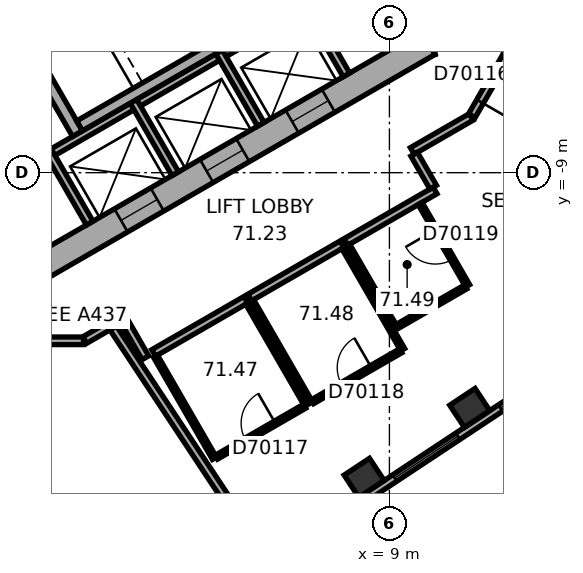
"""IFC4 building model, lengths in metres.
Left out: names, types, materials, properties, quantities, classifications, styles, units other than length and angle.
Written with IfcOpenShell. Run it as: python <this file> out.ifc"""

import sys

from ifc_helpers import new_model, si_unit, direction, frame, frame_2d, origin, origin_2d, place, context, subcontext, project, spatial, rectangle, extrude, element, fill, save


model = new_model("IFC4")
c1 = context("Model", 3, precision=1e-05, world=origin(), true_north=direction((0.0, 1.0)))
c2 = subcontext(c1, "Body", "Model", "MODEL_VIEW")
j1 = project(units=[si_unit("LENGTHUNIT", "METRE"), si_unit("PLANEANGLEUNIT", "RADIAN")], contexts=[c1])
p1 = place(None, origin())
s1 = spatial("IfcSite", under=j1, at=p1, CompositionType="ELEMENT")
p2 = place(p1, origin())
s2 = spatial("IfcBuilding", under=s1, at=p2, CompositionType="ELEMENT")
p3 = place(p2, frame((0.0, 0.0, 289.4)))
s3 = spatial("IfcBuildingStorey", under=s2, at=p3, CompositionType="ELEMENT", Elevation=289.4)
for number, where, z_axis, x_axis in (
    (1, (8.335, -17.028, 0.0), (0.0, 0.0, 1.0), (0.834, 0.552, 0.0)),
    (2, (11.113, -15.189, 0.0), (0.0, 0.0, 1.0), (0.834, 0.552, 0.0)),
):
    element("IfcColumn", number, at=place(p3, frame(where, z_axis=z_axis, x_axis=x_axis)), inside=s3, PredefinedType="COLUMN", context=c2, shape_type="SweptSolid", body=[
        extrude(rectangle(XDim=0.8, YDim=0.7, at=origin_2d()), origin(), (0.0, 0.0, 1.0), 3.7),
    ])
p4 = place(p3, frame((9.85, -5.889, 0.0), z_axis=(0.0, 0.0, 1.0), x_axis=(0.0, 1.0, 0.0)))
e3 = element("IfcWall", 3, at=p4, inside=s3, PredefinedType="SHEAR", context=c2, shape_type="SweptSolid", body=[
    extrude(rectangle(XDim=11.778, YDim=0.7, at=frame_2d((5.889, 0.0))), origin(), (0.0, 0.0, 1.0), 3.7),
])
p5 = place(p4, frame((6.089, 0.0, 0.0)))
e4 = element("IfcOpeningElement", 4, at=p5, cuts=e3, PredefinedType="OPENING", context=c2, shape_type="SweptSolid", body=[
    extrude(rectangle(XDim=1.5, YDim=2.1, at=frame_2d((0.75, 1.05))), frame((0.0, 0.36, 0.0), z_axis=(0.0, -1.0, 0.0), x_axis=(1.0, 0.0, 0.0)), (0.0, 0.0, 1.0), 0.72),
])
p6 = place(p4, frame((2.939, 0.0, 0.0)))
e5 = element("IfcOpeningElement", 5, at=p6, cuts=e3, PredefinedType="OPENING", context=c2, shape_type="SweptSolid", body=[
    extrude(rectangle(XDim=0.9, YDim=2.1, at=frame_2d((0.45, 1.05))), frame((0.0, 0.36, 0.0), z_axis=(0.0, -1.0, 0.0), x_axis=(1.0, 0.0, 0.0)), (0.0, 0.0, 1.0), 0.72),
])
p7 = place(p3, frame((-10.025, -5.586, 0.0), z_axis=(0.0, 0.0, 1.0), x_axis=(0.866026453023, -0.499998182661, 0.0)))
e6 = element("IfcWall", 6, at=p7, inside=s3, PredefinedType="SHEAR", context=c2, shape_type="SweptSolid", body=[
    extrude(rectangle(XDim=11.778, YDim=0.7, at=frame_2d((5.889, 0.0))), origin(), (0.0, 0.0, 1.0), 3.7),
])
p8 = place(p7, frame((6.089, 0.0, 0.0)))
e7 = element("IfcOpeningElement", 7, at=p8, cuts=e6, PredefinedType="OPENING", context=c2, shape_type="SweptSolid", body=[
    extrude(rectangle(XDim=1.5, YDim=2.1, at=frame_2d((0.75, 1.05))), frame((0.0, 0.36, 0.0), z_axis=(0.0, -1.0, 0.0), x_axis=(1.0, 0.0, 0.0)), (0.0, 0.0, 1.0), 0.72),
])
p9 = place(p7, frame((1.539, 0.0, 0.0)))
e8 = element("IfcOpeningElement", 8, at=p9, cuts=e6, PredefinedType="OPENING", context=c2, shape_type="SweptSolid", body=[
    extrude(rectangle(XDim=1.1, YDim=2.1, at=frame_2d((0.55, 1.05))), frame((0.0, 0.36, 0.0), z_axis=(0.0, -1.0, 0.0), x_axis=(1.0, 0.0, 0.0)), (0.0, 0.0, 1.0), 0.72),
])
p10 = place(p7, frame((4.139, 0.0, 0.0)))
e9 = element("IfcOpeningElement", 9, at=p10, cuts=e6, PredefinedType="OPENING", context=c2, shape_type="SweptSolid", body=[
    extrude(rectangle(XDim=1.1, YDim=2.1, at=frame_2d((0.55, 1.05))), frame((0.0, 0.36, 0.0), z_axis=(0.0, -1.0, 0.0), x_axis=(1.0, 0.0, 0.0)), (0.0, 0.0, 1.0), 0.72),
])
p11 = place(p3, frame((-0.175, -11.475, 0.0), z_axis=(0.0, 0.0, 1.0), x_axis=(0.866026453023, 0.499998182661, 0.0)))
e10 = element("IfcWall", 10, at=p11, inside=s3, PredefinedType="SHEAR", context=c2, shape_type="SweptSolid", body=[
    extrude(rectangle(XDim=11.778, YDim=0.7, at=frame_2d((5.889, 0.0))), origin(), (0.0, 0.0, 1.0), 3.7),
])
p12 = place(p11, frame((2.439, 0.0, 0.0)))
e11 = element("IfcOpeningElement", 11, at=p12, cuts=e10, PredefinedType="OPENING", context=c2, shape_type="SweptSolid", body=[
    extrude(rectangle(XDim=1.1, YDim=2.1, at=frame_2d((0.55, 1.05))), frame((0.0, 0.36, 0.0), z_axis=(0.0, -1.0, 0.0), x_axis=(1.0, 0.0, 0.0)), (0.0, 0.0, 1.0), 0.72),
])
p13 = place(p11, frame((5.039, 0.0, 0.0)))
e12 = element("IfcOpeningElement", 12, at=p13, cuts=e10, PredefinedType="OPENING", context=c2, shape_type="SweptSolid", body=[
    extrude(rectangle(XDim=1.1, YDim=2.1, at=frame_2d((0.55, 1.05))), frame((0.0, 0.36, 0.0), z_axis=(0.0, -1.0, 0.0), x_axis=(1.0, 0.0, 0.0)), (0.0, 0.0, 1.0), 0.72),
])
p14 = place(p11, frame((7.639, 0.0, 0.0)))
e13 = element("IfcOpeningElement", 13, at=p14, cuts=e10, PredefinedType="OPENING", context=c2, shape_type="SweptSolid", body=[
    extrude(rectangle(XDim=1.1, YDim=2.1, at=frame_2d((0.55, 1.05))), frame((0.0, 0.36, 0.0), z_axis=(0.0, -1.0, 0.0), x_axis=(1.0, 0.0, 0.0)), (0.0, 0.0, 1.0), 0.72),
])
p15 = place(p3, frame((2.58, -21.377, 0.0), z_axis=(0.0, 0.0, 1.0), x_axis=(0.833888592176, 0.551932800112, 0.0)))
e14 = element("IfcWall", 14, at=p15, inside=s3, PredefinedType="STANDARD", context=c2, shape_type="SweptSolid", body=[
    extrude(rectangle(XDim=17.731, YDim=0.2, at=frame_2d((8.866, 0.0))), origin(), (0.0, 0.0, 1.0), 3.7),
])
p16 = place(p15, frame((1.202, 0.0, 0.9)))
e15 = element("IfcOpeningElement", 15, at=p16, cuts=e14, PredefinedType="OPENING", context=c2, shape_type="SweptSolid", body=[
    extrude(rectangle(XDim=2.0, YDim=2.0, at=frame_2d((1.0, 1.0))), frame((0.0, 0.11, 0.0), z_axis=(0.0, -1.0, 0.0), x_axis=(1.0, 0.0, 0.0)), (0.0, 0.0, 1.0), 0.22),
])
p17 = place(p15, frame((4.533, 0.0, 0.9)))
e16 = element("IfcOpeningElement", 16, at=p17, cuts=e14, PredefinedType="OPENING", context=c2, shape_type="SweptSolid", body=[
    extrude(rectangle(XDim=2.0, YDim=2.0, at=frame_2d((1.0, 1.0))), frame((0.0, 0.11, 0.0), z_axis=(0.0, -1.0, 0.0), x_axis=(1.0, 0.0, 0.0)), (0.0, 0.0, 1.0), 0.22),
])
p18 = place(p15, frame((7.865, 0.0, 0.9)))
e17 = element("IfcOpeningElement", 17, at=p18, cuts=e14, PredefinedType="OPENING", context=c2, shape_type="SweptSolid", body=[
    extrude(rectangle(XDim=2.0, YDim=2.0, at=frame_2d((1.0, 1.0))), frame((0.0, 0.11, 0.0), z_axis=(0.0, -1.0, 0.0), x_axis=(1.0, 0.0, 0.0)), (0.0, 0.0, 1.0), 0.22),
])
p19 = place(p15, frame((11.197, 0.0, 0.9)))
e18 = element("IfcOpeningElement", 18, at=p19, cuts=e14, PredefinedType="OPENING", context=c2, shape_type="SweptSolid", body=[
    extrude(rectangle(XDim=2.0, YDim=2.0, at=frame_2d((1.0, 1.0))), frame((0.0, 0.11, 0.0), z_axis=(0.0, -1.0, 0.0), x_axis=(1.0, 0.0, 0.0)), (0.0, 0.0, 1.0), 0.22),
])
p20 = place(p15, frame((14.528, 0.0, 0.9)))
e19 = element("IfcOpeningElement", 19, at=p20, cuts=e14, PredefinedType="OPENING", context=c2, shape_type="SweptSolid", body=[
    extrude(rectangle(XDim=2.0, YDim=2.0, at=frame_2d((1.0, 1.0))), frame((0.0, 0.11, 0.0), z_axis=(0.0, -1.0, 0.0), x_axis=(1.0, 0.0, 0.0)), (0.0, 0.0, 1.0), 0.22),
])
p21 = place(p3, frame((-0.024, -8.559, 0.0), z_axis=(0.0, 0.0, 1.0), x_axis=(0.866026010844, 0.49999894854, 0.0)))
e20 = element("IfcWall", 20, at=p21, inside=s3, PredefinedType="PARTITIONING", context=c2, shape_type="SweptSolid", body=[
    extrude(rectangle(XDim=8.0, YDim=0.2, at=frame_2d((4.0, 0.0))), origin(), (0.0, 0.0, 1.0), 3.42),
])
for number, where, z_axis, x_axis in (
    (21, (0.013, -8.422, 0.0), (0.0, 0.0, 1.0), (0.5, -0.866, 0.0)),
    (22, (2.264, -7.122, 0.0), (0.0, 0.0, 1.0), (0.5, -0.866, 0.0)),
    (23, (4.516, -5.822, 0.0), (0.0, 0.0, 1.0), (0.5, -0.866, 0.0)),
    (24, (6.768, -4.522, 0.0), (0.0, 0.0, 1.0), (0.5, -0.866, 0.0)),
):
    element("IfcWall", number, at=place(p3, frame(where, z_axis=z_axis, x_axis=x_axis)), inside=s3, PredefinedType="PARTITIONING", context=c2, shape_type="SweptSolid", body=[
        extrude(rectangle(XDim=2.2, YDim=0.2, at=frame_2d((1.1, 0.0))), origin(), (0.0, 0.0, 1.0), 3.42),
    ])
p22 = place(p3, frame((-1.558, -3.902, 0.0), z_axis=(0.0, 0.0, 1.0), x_axis=(0.499977259774, -0.866038532462, 0.0)))
e25 = element("IfcWall", 25, at=p22, inside=s3, PredefinedType="SHEAR", context=c2, shape_type="SweptSolid", body=[
    extrude(rectangle(XDim=4.7, YDim=0.3, at=frame_2d((2.35, 0.0))), origin(), (0.0, 0.0, 1.0), 3.42),
])
p23 = place(p22, frame((0.8, 0.0, 0.0)))
e26 = element("IfcOpeningElement", 26, at=p23, cuts=e25, PredefinedType="OPENING", context=c2, shape_type="SweptSolid", body=[
    extrude(rectangle(XDim=1.2, YDim=2.1, at=frame_2d((0.6, 1.05))), frame((0.0, 0.16, 0.0), z_axis=(0.0, -1.0, 0.0), x_axis=(1.0, 0.0, 0.0)), (0.0, 0.0, 1.0), 0.32),
])
p24 = place(p3, frame((0.847, -7.767, 0.0), z_axis=(0.0, 0.0, 1.0), x_axis=(0.866027801685, 0.499995846692, 0.0)))
e27 = element("IfcWall", 27, at=p24, inside=s3, PredefinedType="SHEAR", context=c2, shape_type="SweptSolid", body=[
    extrude(rectangle(XDim=7.06, YDim=0.3, at=frame_2d((3.53, 0.0))), origin(), (0.0, 0.0, 1.0), 3.42),
])
p25 = place(p3, frame((-0.91, -13.423, 0.0), z_axis=(0.0, 0.0, 1.0), x_axis=(1.0, 0.0, 0.0)))
e28 = element("IfcWall", 28, at=p25, inside=s3, PredefinedType="PARTITIONING", context=c2, shape_type="SweptSolid", body=[
    extrude(rectangle(XDim=1.86, YDim=0.2, at=frame_2d((0.93, 0.0))), origin(), (0.0, 0.0, 1.0), 3.42),
])
p26 = place(p3, frame((0.985, -13.403, 0.0), z_axis=(0.0, 0.0, 1.0), x_axis=(0.866032814021, 0.499987164874, 0.0)))
e29 = element("IfcWall", 29, at=p26, inside=s3, PredefinedType="PARTITIONING", context=c2, shape_type="SweptSolid", body=[
    extrude(rectangle(XDim=0.798, YDim=0.2, at=frame_2d((0.399, 0.0))), origin(), (0.0, 0.0, 1.0), 3.42),
])
p27 = place(p3, frame((1.979, -12.829, 0.0), z_axis=(0.0, 0.0, 1.0), x_axis=(0.500074377092, -0.865982457891, 0.0)))
e30 = element("IfcWall", 30, at=p27, inside=s3, PredefinedType="PARTITIONING", context=c2, shape_type="SweptSolid", body=[
    extrude(rectangle(XDim=1.201, YDim=0.2, at=frame_2d((0.601, 0.0))), origin(), (0.0, 0.0, 1.0), 3.42),
])
p28 = place(p3, frame((2.796, -13.744, 0.0), z_axis=(0.0, 0.0, 1.0), x_axis=(0.866034573852, 0.49998411664, 0.0)))
e31 = element("IfcWall", 31, at=p28, inside=s3, PredefinedType="PARTITIONING", context=c2, shape_type="SweptSolid", body=[
    extrude(rectangle(XDim=2.8, YDim=0.2, at=frame_2d((1.4, 0.0))), origin(), (0.0, 0.0, 1.0), 3.42),
])
p29 = place(p3, frame((4.396, -16.516, 0.0), z_axis=(0.0, 0.0, 1.0), x_axis=(-0.49999285859, 0.86602952684, 0.0)))
e32 = element("IfcWall", 32, at=p29, inside=s3, PredefinedType="PARTITIONING", context=c2, shape_type="SweptSolid", body=[
    extrude(rectangle(XDim=3.1, YDim=0.12, at=frame_2d((1.55, 0.0))), origin(), (0.0, 0.0, 1.0), 3.42),
])
p30 = place(p3, frame((5.271, -12.431, 0.0), z_axis=(0.0, 0.0, 1.0), x_axis=(0.500026960575, -0.86600983753, 0.0)))
e33 = element("IfcWall", 33, at=p30, inside=s3, PredefinedType="PARTITIONING", context=c2, shape_type="SweptSolid", body=[
    extrude(rectangle(XDim=3.1, YDim=0.12, at=frame_2d((1.55, 0.0))), origin(), (0.0, 0.0, 1.0), 3.42),
])
p31 = place(p3, frame((5.325, -12.284, 0.0), z_axis=(0.0, 0.0, 1.0), x_axis=(0.866034573852, 0.49998411664, 0.0)))
e34 = element("IfcWall", 34, at=p31, inside=s3, PredefinedType="PARTITIONING", context=c2, shape_type="SweptSolid", body=[
    extrude(rectangle(XDim=2.8, YDim=0.2, at=frame_2d((1.4, 0.0))), origin(), (0.0, 0.0, 1.0), 3.42),
])
p32 = place(p3, frame((5.364, -18.575, 0.0), z_axis=(0.0, 0.0, 1.0), x_axis=(-0.55195757761, 0.833872191957, 0.0)))
e35 = element("IfcWall", 35, at=p32, inside=s3, PredefinedType="PARTITIONING", context=c2, shape_type="SweptSolid", body=[
    extrude(rectangle(XDim=6.581, YDim=0.2, at=frame_2d((3.291, 0.0))), origin(), (0.0, 0.0, 1.0), 3.42),
])
p33 = place(p3, frame((6.769, -15.146, 0.0), z_axis=(0.0, 0.0, 1.0), x_axis=(-0.866020236886, -0.500008949224, 0.0)))
e36 = element("IfcWall", 36, at=p33, inside=s3, PredefinedType="PARTITIONING", context=c2, shape_type="SweptSolid", body=[
    extrude(rectangle(XDim=2.68, YDim=0.12, at=frame_2d((1.34, 0.0))), origin(), (0.0, 0.0, 1.0), 3.42),
])
p34 = place(p33, frame((0.89, 0.0, 0.0)))
e37 = element("IfcOpeningElement", 37, at=p34, cuts=e36, PredefinedType="OPENING", context=c2, shape_type="SweptSolid", body=[
    extrude(rectangle(XDim=0.9, YDim=2.1, at=frame_2d((0.45, 1.05))), frame((0.0, 0.07, 0.0), z_axis=(0.0, -1.0, 0.0), x_axis=(1.0, 0.0, 0.0)), (0.0, 0.0, 1.0), 0.14),
])
p35 = place(p3, frame((6.925, -15.056, 0.0), z_axis=(0.0, 0.0, 1.0), x_axis=(-0.49999285859, 0.86602952684, 0.0)))
e38 = element("IfcWall", 38, at=p35, inside=s3, PredefinedType="PARTITIONING", context=c2, shape_type="SweptSolid", body=[
    extrude(rectangle(XDim=3.1, YDim=0.12, at=frame_2d((1.55, 0.0))), origin(), (0.0, 0.0, 1.0), 2.87),
])
p36 = place(p3, frame((7.8, -10.971, 0.0), z_axis=(0.0, 0.0, 1.0), x_axis=(0.500026960575, -0.86600983753, 0.0)))
e39 = element("IfcWall", 39, at=p36, inside=s3, PredefinedType="PARTITIONING", context=c2, shape_type="SweptSolid", body=[
    extrude(rectangle(XDim=3.1, YDim=0.12, at=frame_2d((1.55, 0.0))), origin(), (0.0, 0.0, 1.0), 3.42),
])
p37 = place(p3, frame((7.854, -10.824, 0.0), z_axis=(0.0, 0.0, 1.0), x_axis=(0.866029675718, 0.499992600721, 0.0)))
e40 = element("IfcWall", 40, at=p37, inside=s3, PredefinedType="PARTITIONING", context=c2, shape_type="SweptSolid", body=[
    extrude(rectangle(XDim=2.712, YDim=0.2, at=frame_2d((1.356, 0.0))), origin(), (0.0, 0.0, 1.0), 3.42),
])
p38 = place(p3, frame((9.153, -13.076, 0.0), z_axis=(0.0, 0.0, 1.0), x_axis=(-0.500004234368, 0.866022959057, 0.0)))
e41 = element("IfcWall", 41, at=p38, inside=s3, PredefinedType="PARTITIONING", context=c2, shape_type="SweptSolid", body=[
    extrude(rectangle(XDim=2.5, YDim=0.12, at=frame_2d((1.25, 0.0))), origin(), (0.0, 0.0, 1.0), 3.42),
])
p39 = place(p3, frame((9.298, -13.686, 0.0), z_axis=(0.0, 0.0, 1.0), x_axis=(-0.866020236886, -0.500008949224, 0.0)))
e42 = element("IfcWall", 42, at=p39, inside=s3, PredefinedType="PARTITIONING", context=c2, shape_type="SweptSolid", body=[
    extrude(rectangle(XDim=2.68, YDim=0.12, at=frame_2d((1.34, 0.0))), origin(), (0.0, 0.0, 1.0), 3.42),
])
p40 = place(p39, frame((0.89, 0.0, 0.0)))
e43 = element("IfcOpeningElement", 43, at=p40, cuts=e42, PredefinedType="OPENING", context=c2, shape_type="SweptSolid", body=[
    extrude(rectangle(XDim=0.9, YDim=2.1, at=frame_2d((0.45, 1.05))), frame((0.0, 0.07, 0.0), z_axis=(0.0, -1.0, 0.0), x_axis=(1.0, 0.0, 0.0)), (0.0, 0.0, 1.0), 0.14),
])
p41 = place(p3, frame((9.602, -8.428, 0.0), z_axis=(0.0, 0.0, 1.0), x_axis=(0.865999114786, 0.500045531117, 0.0)))
e44 = element("IfcWall", 44, at=p41, inside=s3, PredefinedType="PARTITIONING", context=c2, shape_type="SweptSolid", body=[
    extrude(rectangle(XDim=1.788, YDim=0.2, at=frame_2d((0.894, 0.0))), origin(), (0.0, 0.0, 1.0), 3.42),
])
p42 = place(p3, frame((9.809, -9.811, 0.0), z_axis=(0.0, 0.0, 1.0), x_axis=(0.499961950354, -0.866047370643, 0.0)))
e45 = element("IfcWall", 45, at=p42, inside=s3, PredefinedType="PARTITIONING", context=c2, shape_type="SweptSolid", body=[
    extrude(rectangle(XDim=2.5, YDim=0.12, at=frame_2d((1.25, 0.0))), origin(), (0.0, 0.0, 1.0), 3.42),
])
p43 = place(p42, frame((0.8, 0.0, 0.0)))
e46 = element("IfcOpeningElement", 46, at=p43, cuts=e45, PredefinedType="OPENING", context=c2, shape_type="SweptSolid", body=[
    extrude(rectangle(XDim=0.9, YDim=2.1, at=frame_2d((0.45, 1.05))), frame((0.0, 0.07, 0.0), z_axis=(0.0, -1.0, 0.0), x_axis=(1.0, 0.0, 0.0)), (0.0, 0.0, 1.0), 0.14),
])
p44 = place(p3, frame((10.152, -9.382, 0.0), z_axis=(0.0, 0.0, 1.0), x_axis=(-0.499968756647, 0.866043441391, 0.0)))
e47 = element("IfcWall", 47, at=p44, inside=s3, PredefinedType="PARTITIONING", context=c2, shape_type="SweptSolid", body=[
    extrude(rectangle(XDim=1.001, YDim=0.2, at=frame_2d((0.5, 0.0))), origin(), (0.0, 0.0, 1.0), 3.42),
])
p45 = place(p3, frame((11.007, -12.006, 0.0), z_axis=(0.0, 0.0, 1.0), x_axis=(-0.866009661879, -0.500027264788, 0.0)))
e48 = element("IfcWall", 48, at=p45, inside=s3, PredefinedType="PARTITIONING", context=c2, shape_type="SweptSolid", body=[
    extrude(rectangle(XDim=2.08, YDim=0.12, at=frame_2d((1.04, 0.0))), origin(), (0.0, 0.0, 1.0), 3.42),
])
p46 = place(p3, frame((11.17, -7.5, 0.0), z_axis=(0.0, 0.0, 1.0), x_axis=(0.500006454166, 0.866021677438, 0.0)))
e49 = element("IfcWall", 49, at=p46, inside=s3, PredefinedType="PARTITIONING", context=c2, shape_type="SweptSolid", body=[
    extrude(rectangle(XDim=1.86, YDim=0.2, at=frame_2d((0.93, 0.0))), origin(), (0.0, 0.0, 1.0), 3.42),
])
p47 = place(p46, frame((0.43, 0.0, 0.0)))
e50 = element("IfcOpeningElement", 50, at=p47, cuts=e49, PredefinedType="OPENING", context=c2, shape_type="SweptSolid", body=[
    extrude(rectangle(XDim=1.0, YDim=2.1, at=frame_2d((0.5, 1.05))), frame((0.0, 0.11, 0.0), z_axis=(0.0, -1.0, 0.0), x_axis=(1.0, 0.0, 0.0)), (0.0, 0.0, 1.0), 0.22),
])
p48 = place(p18, origin())
e51 = element("IfcWindow", 51, at=p48, inside=s3, PartitioningType="SINGLE_PANEL", PredefinedType="WINDOW", context=c2, shape_type="SweptSolid", body=[
    extrude(rectangle(XDim=2.0, YDim=2.0, at=frame_2d((1.0, 1.0))), frame((0.0, 0.03, 0.0), z_axis=(0.0, -1.0, 0.0), x_axis=(1.0, 0.0, 0.0)), (0.0, 0.0, 1.0), 0.06),
])
fill(e17, e51)
p49 = place(p19, origin())
e52 = element("IfcWindow", 52, at=p49, inside=s3, PartitioningType="SINGLE_PANEL", PredefinedType="WINDOW", context=c2, shape_type="SweptSolid", body=[
    extrude(rectangle(XDim=2.0, YDim=2.0, at=frame_2d((1.0, 1.0))), frame((0.0, 0.03, 0.0), z_axis=(0.0, -1.0, 0.0), x_axis=(1.0, 0.0, 0.0)), (0.0, 0.0, 1.0), 0.06),
])
fill(e18, e52)
p50 = place(p12, origin())
e53 = element("IfcDoor", 53, at=p50, inside=s3, OperationType="DOUBLE_DOOR_SLIDING", PredefinedType="DOOR", context=c2, shape_type="SweptSolid", body=[
    extrude(rectangle(XDim=1.1, YDim=2.1, at=frame_2d((0.55, 1.05))), frame((0.0, 0.025, 0.0), z_axis=(0.0, -1.0, 0.0), x_axis=(1.0, 0.0, 0.0)), (0.0, 0.0, 1.0), 0.05),
])
fill(e11, e53)
p51 = place(p13, origin())
e54 = element("IfcDoor", 54, at=p51, inside=s3, OperationType="DOUBLE_DOOR_SLIDING", PredefinedType="DOOR", context=c2, shape_type="SweptSolid", body=[
    extrude(rectangle(XDim=1.1, YDim=2.1, at=frame_2d((0.55, 1.05))), frame((0.0, 0.025, 0.0), z_axis=(0.0, -1.0, 0.0), x_axis=(1.0, 0.0, 0.0)), (0.0, 0.0, 1.0), 0.05),
])
fill(e12, e54)
p52 = place(p14, origin())
e55 = element("IfcDoor", 55, at=p52, inside=s3, OperationType="DOUBLE_DOOR_SLIDING", PredefinedType="DOOR", context=c2, shape_type="SweptSolid", body=[
    extrude(rectangle(XDim=1.1, YDim=2.1, at=frame_2d((0.55, 1.05))), frame((0.0, 0.025, 0.0), z_axis=(0.0, -1.0, 0.0), x_axis=(1.0, 0.0, 0.0)), (0.0, 0.0, 1.0), 0.05),
])
fill(e13, e55)
p53 = place(p47, origin())
e56 = element("IfcDoor", 56, at=p53, inside=s3, OperationType="SINGLE_SWING_LEFT", PredefinedType="DOOR", context=c2, shape_type="SweptSolid", body=[
    extrude(rectangle(XDim=1.0, YDim=2.1, at=frame_2d((0.5, 1.05))), frame((0.0, 0.025, 0.0), z_axis=(0.0, -1.0, 0.0), x_axis=(1.0, 0.0, 0.0)), (0.0, 0.0, 1.0), 0.05),
])
fill(e50, e56)
p54 = place(p34, origin())
e57 = element("IfcDoor", 57, at=p54, inside=s3, OperationType="SINGLE_SWING_LEFT", PredefinedType="DOOR", context=c2, shape_type="SweptSolid", body=[
    extrude(rectangle(XDim=0.9, YDim=2.1, at=frame_2d((0.45, 1.05))), frame((0.0, 0.025, 0.0), z_axis=(0.0, -1.0, 0.0), x_axis=(1.0, 0.0, 0.0)), (0.0, 0.0, 1.0), 0.05),
])
fill(e37, e57)
p55 = place(p40, origin())
e58 = element("IfcDoor", 58, at=p55, inside=s3, OperationType="SINGLE_SWING_LEFT", PredefinedType="DOOR", context=c2, shape_type="SweptSolid", body=[
    extrude(rectangle(XDim=0.9, YDim=2.1, at=frame_2d((0.45, 1.05))), frame((0.0, 0.025, 0.0), z_axis=(0.0, -1.0, 0.0), x_axis=(1.0, 0.0, 0.0)), (0.0, 0.0, 1.0), 0.05),
])
fill(e43, e58)
p56 = place(p43, origin())
e59 = element("IfcDoor", 59, at=p56, inside=s3, OperationType="SINGLE_SWING_LEFT", PredefinedType="DOOR", context=c2, shape_type="SweptSolid", body=[
    extrude(rectangle(XDim=0.9, YDim=2.1, at=frame_2d((0.45, 1.05))), frame((0.0, 0.025, 0.0), z_axis=(0.0, -1.0, 0.0), x_axis=(1.0, 0.0, 0.0)), (0.0, 0.0, 1.0), 0.05),
])
fill(e46, e59)
save(model, sys.argv[1])
